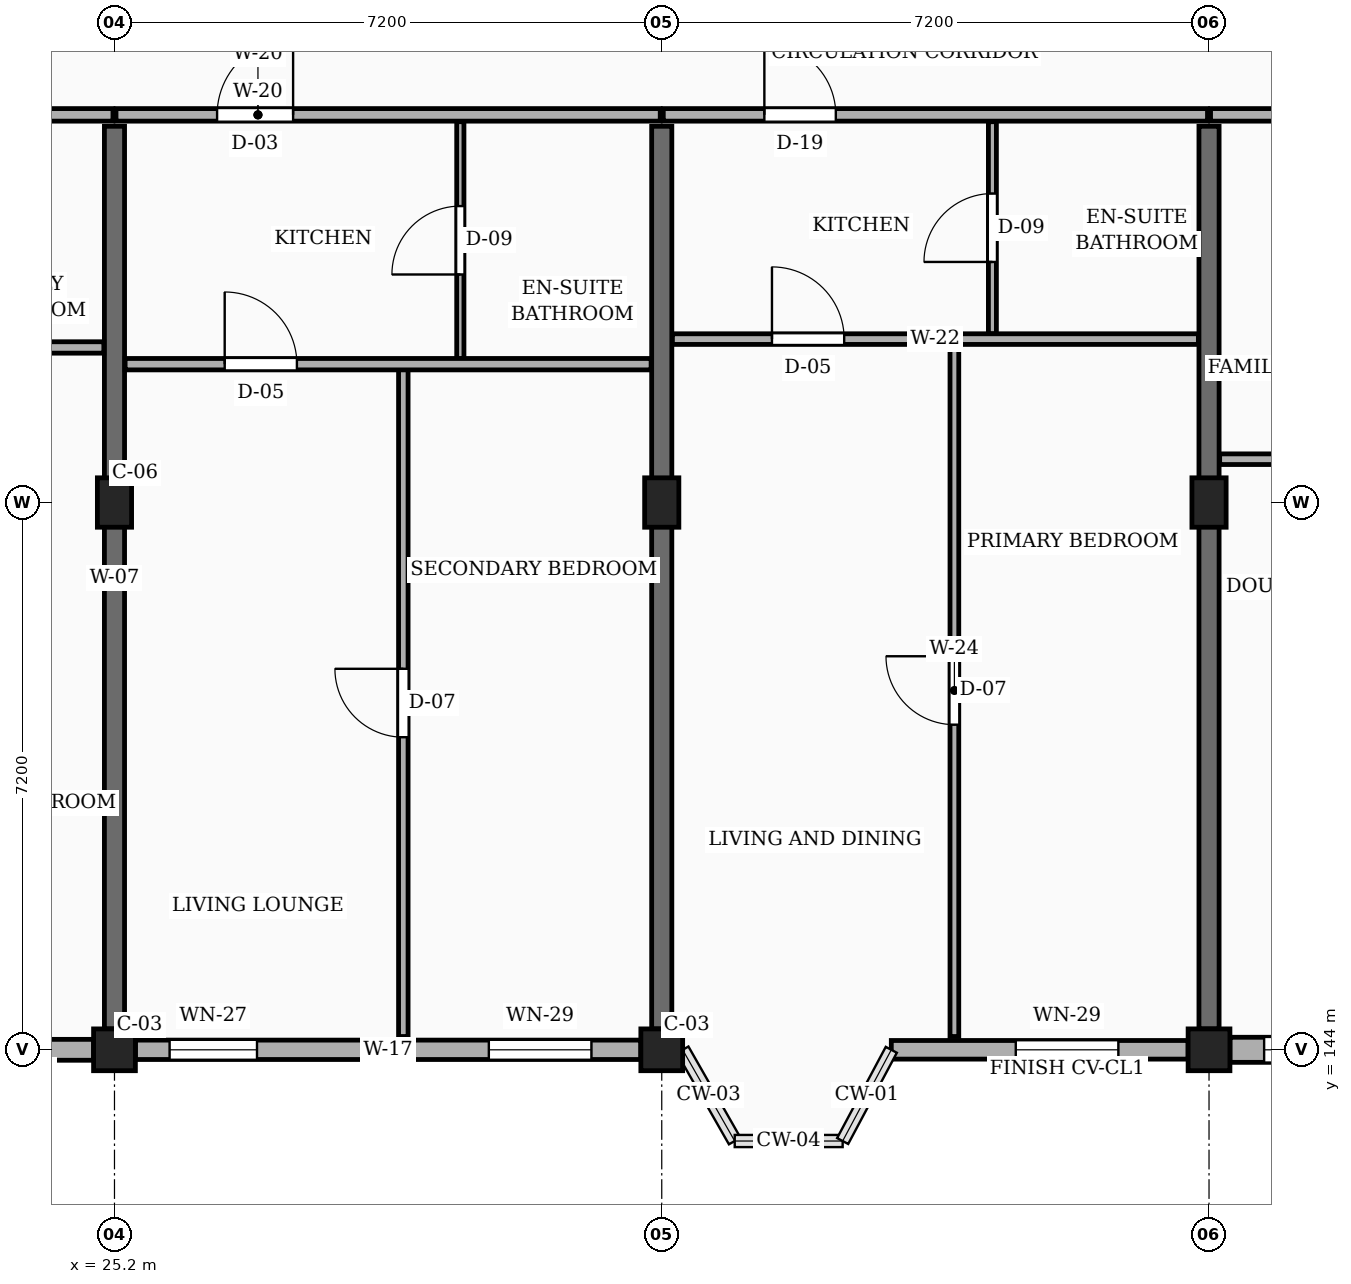
"""IFC4 building model, lengths in metres.
Left out: names, types, materials, properties, quantities, classifications, styles, units other than length and angle.
Written with IfcOpenShell. Run it as: python <this file> out.ifc"""

import sys

from ifc_helpers import new_model, si_unit, direction, frame, frame_2d, origin, origin_2d, place, context, subcontext, project, spatial, rectangle, extrude, element, fill, save


model = new_model("IFC4")
c1 = context("Model", 3, precision=1e-05, world=origin(), true_north=direction((0.0, 1.0)))
c2 = subcontext(c1, "Body", "Model", "MODEL_VIEW")
j1 = project(units=[si_unit("LENGTHUNIT", "METRE"), si_unit("PLANEANGLEUNIT", "RADIAN")], contexts=[c1])
p1 = place(None, origin())
s1 = spatial("IfcSite", under=j1, at=p1, CompositionType="ELEMENT")
p2 = place(p1, origin())
s2 = spatial("IfcBuilding", under=s1, at=p2, CompositionType="ELEMENT")
p3 = place(p2, frame((0.0, 0.0, 10.8)))
s3 = spatial("IfcBuildingStorey", under=s2, at=p3, CompositionType="ELEMENT", Elevation=10.8)
p4 = place(p3, frame((25.2, 144.0, 0.0), z_axis=(0.0, 0.0, 1.0), x_axis=(1.0, 0.0, 0.0)))
e1 = element("IfcColumn", 1, at=p4, inside=s3, PredefinedType="COLUMN", context=c2, shape_type="SweptSolid", body=[
    extrude(rectangle(XDim=0.55, YDim=0.55, at=origin_2d()), origin(), (0.0, 0.0, 1.0), 3.15),
])
p5 = place(p3, frame((25.2, 151.2, 0.0), z_axis=(0.0, 0.0, 1.0), x_axis=(1.0, 0.0, 0.0)))
e2 = element("IfcColumn", 2, at=p5, inside=s3, PredefinedType="COLUMN", context=c2, shape_type="SweptSolid", body=[
    extrude(rectangle(XDim=0.45, YDim=0.65, at=origin_2d()), origin(), (0.0, 0.0, 1.0), 3.15),
])
p6 = place(p3, frame((32.4, 144.0, 0.0), z_axis=(0.0, 0.0, 1.0), x_axis=(1.0, 0.0, 0.0)))
e3 = element("IfcColumn", 3, at=p6, inside=s3, PredefinedType="COLUMN", context=c2, shape_type="SweptSolid", body=[
    extrude(rectangle(XDim=0.55, YDim=0.55, at=origin_2d()), origin(), (0.0, 0.0, 1.0), 3.15),
])
p7 = place(p3, frame((32.4, 151.2, 0.0), z_axis=(0.0, 0.0, 1.0), x_axis=(1.0, 0.0, 0.0)))
e4 = element("IfcColumn", 4, at=p7, inside=s3, PredefinedType="COLUMN", context=c2, shape_type="SweptSolid", body=[
    extrude(rectangle(XDim=0.45, YDim=0.65, at=origin_2d()), origin(), (0.0, 0.0, 1.0), 3.15),
])
p8 = place(p3, frame((39.6, 144.0, 0.0), z_axis=(0.0, 0.0, 1.0), x_axis=(1.0, 0.0, 0.0)))
e5 = element("IfcColumn", 5, at=p8, inside=s3, PredefinedType="COLUMN", context=c2, shape_type="SweptSolid", body=[
    extrude(rectangle(XDim=0.55, YDim=0.55, at=origin_2d()), origin(), (0.0, 0.0, 1.0), 3.15),
])
p9 = place(p3, frame((39.6, 151.2, 0.0), z_axis=(0.0, 0.0, 1.0), x_axis=(1.0, 0.0, 0.0)))
e6 = element("IfcColumn", 6, at=p9, inside=s3, PredefinedType="COLUMN", context=c2, shape_type="SweptSolid", body=[
    extrude(rectangle(XDim=0.45, YDim=0.65, at=origin_2d()), origin(), (0.0, 0.0, 1.0), 3.15),
])
for number, where, z_axis, x_axis in (
    (7, (25.2, 144.275, 0.0), (0.0, 0.0, 1.0), (0.0, 1.0, 0.0)),
    (8, (32.4, 144.275, 0.0), (0.0, 0.0, 1.0), (0.0, 1.0, 0.0)),
    (9, (39.6, 144.275, 0.0), (0.0, 0.0, 1.0), (0.0, 1.0, 0.0)),
):
    element("IfcWall", number, at=place(p3, frame(where, z_axis=z_axis, x_axis=x_axis)), inside=s3, PredefinedType="SOLIDWALL", context=c2, shape_type="SweptSolid", body=[
        extrude(rectangle(XDim=11.875, YDim=0.265, at=frame_2d((5.938, 0.0))), origin(), (0.0, 0.0, 1.0), 2.185),
    ])
p10 = place(p3, frame((21.02, 144.0, 0.0), z_axis=(0.0, 0.0, 1.0), x_axis=(1.0, 0.0, 0.0)))
e10 = element("IfcWall", 10, at=p10, inside=s3, PredefinedType="SOLIDWALL", context=c2, shape_type="SweptSolid", body=[
    extrude(rectangle(XDim=3.905, YDim=0.275, at=frame_2d((1.953, 0.0))), origin(), (0.0, 0.0, 1.0), 2.455),
])
p11 = place(p10, frame((1.837, 0.0, 0.78)))
e11 = element("IfcOpeningElement", 11, at=p11, cuts=e10, PredefinedType="OPENING", context=c2, shape_type="SweptSolid", body=[
    extrude(rectangle(XDim=1.05, YDim=1.44, at=frame_2d((0.525, 0.72))), frame((0.0, 0.147, 0.0), z_axis=(0.0, -1.0, 0.0), x_axis=(1.0, 0.0, 0.0)), (0.0, 0.0, 1.0), 0.295),
])
p12 = place(p3, frame((25.475, 144.0, 0.0), z_axis=(0.0, 0.0, 1.0), x_axis=(1.0, 0.0, 0.0)))
e12 = element("IfcWall", 12, at=p12, inside=s3, PredefinedType="SOLIDWALL", context=c2, shape_type="SweptSolid", body=[
    extrude(rectangle(XDim=6.65, YDim=0.255, at=frame_2d((3.325, 0.0))), origin(), (0.0, 0.0, 1.0), 2.455),
])
p13 = place(p12, frame((0.45, 0.0, 0.78)))
e13 = element("IfcOpeningElement", 13, at=p13, cuts=e12, PredefinedType="OPENING", context=c2, shape_type="SweptSolid", body=[
    extrude(rectangle(XDim=1.15, YDim=1.44, at=frame_2d((0.575, 0.72))), frame((0.0, 0.137, 0.0), z_axis=(0.0, -1.0, 0.0), x_axis=(1.0, 0.0, 0.0)), (0.0, 0.0, 1.0), 0.275),
])
p14 = place(p12, frame((4.65, 0.0, 0.78)))
e14 = element("IfcOpeningElement", 14, at=p14, cuts=e12, PredefinedType="OPENING", context=c2, shape_type="SweptSolid", body=[
    extrude(rectangle(XDim=1.35, YDim=1.44, at=frame_2d((0.675, 0.72))), frame((0.0, 0.137, 0.0), z_axis=(0.0, -1.0, 0.0), x_axis=(1.0, 0.0, 0.0)), (0.0, 0.0, 1.0), 0.275),
])
p15 = place(p3, frame((35.42, 144.0, 0.0), z_axis=(0.0, 0.0, 1.0), x_axis=(1.0, 0.0, 0.0)))
e15 = element("IfcWall", 15, at=p15, inside=s3, PredefinedType="SOLIDWALL", context=c2, shape_type="SweptSolid", body=[
    extrude(rectangle(XDim=3.905, YDim=0.245, at=frame_2d((1.953, 0.0))), origin(), (0.0, 0.0, 1.0), 2.455),
])
p16 = place(p15, frame((1.637, 0.0, 0.78)))
e16 = element("IfcOpeningElement", 16, at=p16, cuts=e15, PredefinedType="OPENING", context=c2, shape_type="SweptSolid", body=[
    extrude(rectangle(XDim=1.35, YDim=1.44, at=frame_2d((0.675, 0.72))), frame((0.0, 0.133, 0.0), z_axis=(0.0, -1.0, 0.0), x_axis=(1.0, 0.0, 0.0)), (0.0, 0.0, 1.0), 0.265),
])
p17 = place(p3, frame((39.875, 144.0, 0.0), z_axis=(0.0, 0.0, 1.0), x_axis=(1.0, 0.0, 0.0)))
e17 = element("IfcWall", 17, at=p17, inside=s3, PredefinedType="SOLIDWALL", context=c2, shape_type="SweptSolid", body=[
    extrude(rectangle(XDim=6.65, YDim=0.33, at=frame_2d((3.325, 0.0))), origin(), (0.0, 0.0, 1.0), 2.455),
])
p18 = place(p17, frame((0.45, 0.0, 0.78)))
e18 = element("IfcOpeningElement", 18, at=p18, cuts=e17, PredefinedType="OPENING", context=c2, shape_type="SweptSolid", body=[
    extrude(rectangle(XDim=1.45, YDim=1.44, at=frame_2d((0.725, 0.72))), frame((0.0, 0.175, 0.0), z_axis=(0.0, -1.0, 0.0), x_axis=(1.0, 0.0, 0.0)), (0.0, 0.0, 1.0), 0.35),
])
p19 = place(p17, frame((4.65, 0.0, 0.78)))
e19 = element("IfcOpeningElement", 19, at=p19, cuts=e17, PredefinedType="OPENING", context=c2, shape_type="SweptSolid", body=[
    extrude(rectangle(XDim=0.92, YDim=1.15, at=frame_2d((0.46, 0.575))), frame((0.0, 0.175, 0.0), z_axis=(0.0, -1.0, 0.0), x_axis=(1.0, 0.0, 0.0)), (0.0, 0.0, 1.0), 0.35),
])
p20 = place(p3, frame((18.02, 156.3, 0.0), z_axis=(0.0, 0.0, 1.0), x_axis=(1.0, 0.0, 0.0)))
e20 = element("IfcWall", 20, at=p20, inside=s3, PredefinedType="PARTITIONING", context=c2, shape_type="SweptSolid", body=[
    extrude(rectangle(XDim=7.16, YDim=0.165, at=frame_2d((3.58, 0.0))), origin(), (0.0, 0.0, 1.0), 2.32),
])
p21 = place(p20, frame((1.33, 0.0, 0.0)))
e21 = element("IfcOpeningElement", 21, at=p21, cuts=e20, PredefinedType="OPENING", context=c2, shape_type="SweptSolid", body=[
    extrude(rectangle(XDim=1.14, YDim=2.18, at=frame_2d((0.57, 1.09))), frame((0.0, 0.093, 0.0), z_axis=(0.0, -1.0, 0.0), x_axis=(1.0, 0.0, 0.0)), (0.0, 0.0, 1.0), 0.185),
])
p22 = place(p3, frame((25.22, 156.3, 0.0), z_axis=(0.0, 0.0, 1.0), x_axis=(1.0, 0.0, 0.0)))
e22 = element("IfcWall", 22, at=p22, inside=s3, PredefinedType="PARTITIONING", context=c2, shape_type="SweptSolid", body=[
    extrude(rectangle(XDim=7.16, YDim=0.165, at=frame_2d((3.58, 0.0))), origin(), (0.0, 0.0, 1.0), 2.32),
])
p23 = place(p22, frame((1.33, 0.0, 0.0)))
e23 = element("IfcOpeningElement", 23, at=p23, cuts=e22, PredefinedType="OPENING", context=c2, shape_type="SweptSolid", body=[
    extrude(rectangle(XDim=1.0, YDim=2.15, at=frame_2d((0.5, 1.075))), frame((0.0, 0.093, 0.0), z_axis=(0.0, -1.0, 0.0), x_axis=(1.0, 0.0, 0.0)), (0.0, 0.0, 1.0), 0.185),
])
p24 = place(p3, frame((32.42, 156.3, 0.0), z_axis=(0.0, 0.0, 1.0), x_axis=(1.0, 0.0, 0.0)))
e24 = element("IfcWall", 24, at=p24, inside=s3, PredefinedType="PARTITIONING", context=c2, shape_type="SweptSolid", body=[
    extrude(rectangle(XDim=7.16, YDim=0.165, at=frame_2d((3.58, 0.0))), origin(), (0.0, 0.0, 1.0), 2.32),
])
p25 = place(p24, frame((1.33, 0.0, 0.0)))
e25 = element("IfcOpeningElement", 25, at=p25, cuts=e24, PredefinedType="OPENING", context=c2, shape_type="SweptSolid", body=[
    extrude(rectangle(XDim=0.94, YDim=2.12, at=frame_2d((0.47, 1.06))), frame((0.0, 0.093, 0.0), z_axis=(0.0, -1.0, 0.0), x_axis=(1.0, 0.0, 0.0)), (0.0, 0.0, 1.0), 0.185),
])
p26 = place(p3, frame((39.62, 156.3, 0.0), z_axis=(0.0, 0.0, 1.0), x_axis=(1.0, 0.0, 0.0)))
e26 = element("IfcWall", 26, at=p26, inside=s3, PredefinedType="PARTITIONING", context=c2, shape_type="SweptSolid", body=[
    extrude(rectangle(XDim=7.16, YDim=0.165, at=frame_2d((3.58, 0.0))), origin(), (0.0, 0.0, 1.0), 2.32),
])
p27 = place(p26, frame((4.78, 0.0, 0.0)))
e27 = element("IfcOpeningElement", 27, at=p27, cuts=e26, PredefinedType="OPENING", context=c2, shape_type="SweptSolid", body=[
    extrude(rectangle(XDim=1.14, YDim=2.18, at=frame_2d((0.57, 1.09))), frame((0.0, 0.093, 0.0), z_axis=(0.0, -1.0, 0.0), x_axis=(1.0, 0.0, 0.0)), (0.0, 0.0, 1.0), 0.185),
])
p28 = place(p3, frame((18.14, 153.24, 0.0), z_axis=(0.0, 0.0, 1.0), x_axis=(1.0, 0.0, 0.0)))
e28 = element("IfcWall", 28, at=p28, inside=s3, PredefinedType="PARTITIONING", context=c2, shape_type="SweptSolid", body=[
    extrude(rectangle(XDim=6.92, YDim=0.15, at=frame_2d((3.46, 0.0))), origin(), (0.0, 0.0, 1.0), 2.32),
])
p29 = place(p28, frame((1.31, 0.0, 0.0)))
e29 = element("IfcOpeningElement", 29, at=p29, cuts=e28, PredefinedType="OPENING", context=c2, shape_type="SweptSolid", body=[
    extrude(rectangle(XDim=0.92, YDim=2.1, at=frame_2d((0.46, 1.05))), frame((0.0, 0.085, 0.0), z_axis=(0.0, -1.0, 0.0), x_axis=(1.0, 0.0, 0.0)), (0.0, 0.0, 1.0), 0.17),
])
p30 = place(p3, frame((29.0, 144.175, 0.0), z_axis=(0.0, 0.0, 1.0), x_axis=(0.0, 1.0, 0.0)))
e30 = element("IfcWall", 30, at=p30, inside=s3, PredefinedType="PARTITIONING", context=c2, shape_type="SweptSolid", body=[
    extrude(rectangle(XDim=8.775, YDim=0.125, at=frame_2d((4.387, 0.0))), origin(), (0.0, 0.0, 1.0), 2.32),
])
p31 = place(p30, frame((3.938, 0.0, 0.0)))
e31 = element("IfcOpeningElement", 31, at=p31, cuts=e30, PredefinedType="OPENING", context=c2, shape_type="SweptSolid", body=[
    extrude(rectangle(XDim=0.9, YDim=2.1, at=frame_2d((0.45, 1.05))), frame((0.0, 0.073, 0.0), z_axis=(0.0, -1.0, 0.0), x_axis=(1.0, 0.0, 0.0)), (0.0, 0.0, 1.0), 0.145),
])
p32 = place(p3, frame((29.75, 153.09, 0.0), z_axis=(0.0, 0.0, 1.0), x_axis=(0.0, 1.0, 0.0)))
e32 = element("IfcWall", 32, at=p32, inside=s3, PredefinedType="PARTITIONING", context=c2, shape_type="SweptSolid", body=[
    extrude(rectangle(XDim=3.12, YDim=0.095, at=frame_2d((1.56, 0.0))), origin(), (0.0, 0.0, 1.0), 2.32),
])
p33 = place(p32, frame((1.11, 0.0, 0.0)))
e33 = element("IfcOpeningElement", 33, at=p33, cuts=e32, PredefinedType="OPENING", context=c2, shape_type="SweptSolid", body=[
    extrude(rectangle(XDim=0.9, YDim=2.05, at=frame_2d((0.45, 1.025))), frame((0.0, 0.058, 0.0), z_axis=(0.0, -1.0, 0.0), x_axis=(1.0, 0.0, 0.0)), (0.0, 0.0, 1.0), 0.115),
])
p34 = place(p3, frame((25.34, 153.02, 0.0), z_axis=(0.0, 0.0, 1.0), x_axis=(1.0, 0.0, 0.0)))
e34 = element("IfcWall", 34, at=p34, inside=s3, PredefinedType="PARTITIONING", context=c2, shape_type="SweptSolid", body=[
    extrude(rectangle(XDim=6.92, YDim=0.15, at=frame_2d((3.46, 0.0))), origin(), (0.0, 0.0, 1.0), 2.32),
])
p35 = place(p34, frame((1.31, 0.0, 0.0)))
e35 = element("IfcOpeningElement", 35, at=p35, cuts=e34, PredefinedType="OPENING", context=c2, shape_type="SweptSolid", body=[
    extrude(rectangle(XDim=0.95, YDim=2.1, at=frame_2d((0.475, 1.05))), frame((0.0, 0.085, 0.0), z_axis=(0.0, -1.0, 0.0), x_axis=(1.0, 0.0, 0.0)), (0.0, 0.0, 1.0), 0.17),
])
p36 = place(p3, frame((36.25, 144.175, 0.0), z_axis=(0.0, 0.0, 1.0), x_axis=(0.0, 1.0, 0.0)))
e36 = element("IfcWall", 36, at=p36, inside=s3, PredefinedType="PARTITIONING", context=c2, shape_type="SweptSolid", body=[
    extrude(rectangle(XDim=9.105, YDim=0.115, at=frame_2d((4.552, 0.0))), origin(), (0.0, 0.0, 1.0), 2.32),
])
p37 = place(p36, frame((4.103, 0.0, 0.0)))
e37 = element("IfcOpeningElement", 37, at=p37, cuts=e36, PredefinedType="OPENING", context=c2, shape_type="SweptSolid", body=[
    extrude(rectangle(XDim=0.9, YDim=2.1, at=frame_2d((0.45, 1.05))), frame((0.0, 0.067, 0.0), z_axis=(0.0, -1.0, 0.0), x_axis=(1.0, 0.0, 0.0)), (0.0, 0.0, 1.0), 0.135),
])
p38 = place(p3, frame((36.75, 153.42, 0.0), z_axis=(0.0, 0.0, 1.0), x_axis=(0.0, 1.0, 0.0)))
e38 = element("IfcWall", 38, at=p38, inside=s3, PredefinedType="PARTITIONING", context=c2, shape_type="SweptSolid", body=[
    extrude(rectangle(XDim=2.79, YDim=0.105, at=frame_2d((1.395, 0.0))), origin(), (0.0, 0.0, 1.0), 2.32),
])
p39 = place(p38, frame((0.945, 0.0, 0.0)))
e39 = element("IfcOpeningElement", 39, at=p39, cuts=e38, PredefinedType="OPENING", context=c2, shape_type="SweptSolid", body=[
    extrude(rectangle(XDim=0.9, YDim=2.05, at=frame_2d((0.45, 1.025))), frame((0.0, 0.062, 0.0), z_axis=(0.0, -1.0, 0.0), x_axis=(1.0, 0.0, 0.0)), (0.0, 0.0, 1.0), 0.125),
])
p40 = place(p3, frame((32.54, 153.35, 0.0), z_axis=(0.0, 0.0, 1.0), x_axis=(1.0, 0.0, 0.0)))
e40 = element("IfcWall", 40, at=p40, inside=s3, PredefinedType="PARTITIONING", context=c2, shape_type="SweptSolid", body=[
    extrude(rectangle(XDim=6.92, YDim=0.14, at=frame_2d((3.46, 0.0))), origin(), (0.0, 0.0, 1.0), 2.32),
])
p41 = place(p40, frame((1.31, 0.0, 0.0)))
e41 = element("IfcOpeningElement", 41, at=p41, cuts=e40, PredefinedType="OPENING", context=c2, shape_type="SweptSolid", body=[
    extrude(rectangle(XDim=0.95, YDim=2.1, at=frame_2d((0.475, 1.05))), frame((0.0, 0.08, 0.0), z_axis=(0.0, -1.0, 0.0), x_axis=(1.0, 0.0, 0.0)), (0.0, 0.0, 1.0), 0.16),
])
p42 = place(p3, frame((39.74, 151.77, 0.0), z_axis=(0.0, 0.0, 1.0), x_axis=(1.0, 0.0, 0.0)))
e42 = element("IfcWall", 42, at=p42, inside=s3, PredefinedType="PARTITIONING", context=c2, shape_type="SweptSolid", body=[
    extrude(rectangle(XDim=6.92, YDim=0.14, at=frame_2d((3.46, 0.0))), origin(), (0.0, 0.0, 1.0), 2.32),
])
p43 = place(p42, frame((4.66, 0.0, 0.0)))
e43 = element("IfcOpeningElement", 43, at=p43, cuts=e42, PredefinedType="OPENING", context=c2, shape_type="SweptSolid", body=[
    extrude(rectangle(XDim=0.92, YDim=2.1, at=frame_2d((0.46, 1.05))), frame((0.0, 0.08, 0.0), z_axis=(0.0, -1.0, 0.0), x_axis=(1.0, 0.0, 0.0)), (0.0, 0.0, 1.0), 0.16),
])
p44 = place(p13, origin())
e44 = element("IfcWindow", 44, at=p44, inside=s3, PartitioningType="SINGLE_PANEL", PredefinedType="WINDOW", context=c2, shape_type="SweptSolid", body=[
    extrude(rectangle(XDim=1.15, YDim=1.44, at=frame_2d((0.575, 0.72))), frame((0.0, 0.03, 0.0), z_axis=(0.0, -1.0, 0.0), x_axis=(1.0, 0.0, 0.0)), (0.0, 0.0, 1.0), 0.06),
])
fill(e13, e44)
p45 = place(p14, origin())
e45 = element("IfcWindow", 45, at=p45, inside=s3, PartitioningType="SINGLE_PANEL", PredefinedType="WINDOW", context=c2, shape_type="SweptSolid", body=[
    extrude(rectangle(XDim=1.35, YDim=1.44, at=frame_2d((0.675, 0.72))), frame((0.0, 0.03, 0.0), z_axis=(0.0, -1.0, 0.0), x_axis=(1.0, 0.0, 0.0)), (0.0, 0.0, 1.0), 0.06),
])
fill(e14, e45)
p46 = place(p16, origin())
e46 = element("IfcWindow", 46, at=p46, inside=s3, PartitioningType="SINGLE_PANEL", PredefinedType="WINDOW", context=c2, shape_type="SweptSolid", body=[
    extrude(rectangle(XDim=1.35, YDim=1.44, at=frame_2d((0.675, 0.72))), frame((0.0, 0.03, 0.0), z_axis=(0.0, -1.0, 0.0), x_axis=(1.0, 0.0, 0.0)), (0.0, 0.0, 1.0), 0.06),
])
fill(e16, e46)
p47 = place(p18, origin())
e47 = element("IfcWindow", 47, at=p47, inside=s3, PartitioningType="SINGLE_PANEL", PredefinedType="WINDOW", context=c2, shape_type="SweptSolid", body=[
    extrude(rectangle(XDim=1.45, YDim=1.44, at=frame_2d((0.725, 0.72))), frame((0.0, 0.03, 0.0), z_axis=(0.0, -1.0, 0.0), x_axis=(1.0, 0.0, 0.0)), (0.0, 0.0, 1.0), 0.06),
])
fill(e18, e47)
p48 = place(p23, origin())
e48 = element("IfcDoor", 48, at=p48, inside=s3, OperationType="SINGLE_SWING_RIGHT", PredefinedType="DOOR", context=c2, shape_type="SweptSolid", body=[
    extrude(rectangle(XDim=1.0, YDim=2.15, at=frame_2d((0.5, 1.075))), frame((0.0, 0.025, 0.0), z_axis=(0.0, -1.0, 0.0), x_axis=(1.0, 0.0, 0.0)), (0.0, 0.0, 1.0), 0.05),
])
fill(e23, e48)
p49 = place(p25, origin())
e49 = element("IfcDoor", 49, at=p49, inside=s3, OperationType="SINGLE_SWING_LEFT", PredefinedType="DOOR", context=c2, shape_type="SweptSolid", body=[
    extrude(rectangle(XDim=0.94, YDim=2.12, at=frame_2d((0.47, 1.06))), frame((0.0, 0.025, 0.0), z_axis=(0.0, -1.0, 0.0), x_axis=(1.0, 0.0, 0.0)), (0.0, 0.0, 1.0), 0.05),
])
fill(e25, e49)
p50 = place(p31, origin())
e50 = element("IfcDoor", 50, at=p50, inside=s3, OperationType="SINGLE_SWING_RIGHT", PredefinedType="DOOR", context=c2, shape_type="SweptSolid", body=[
    extrude(rectangle(XDim=0.9, YDim=2.1, at=frame_2d((0.45, 1.05))), frame((0.0, 0.025, 0.0), z_axis=(0.0, -1.0, 0.0), x_axis=(1.0, 0.0, 0.0)), (0.0, 0.0, 1.0), 0.05),
])
fill(e31, e50)
p51 = place(p33, origin())
e51 = element("IfcDoor", 51, at=p51, inside=s3, OperationType="SINGLE_SWING_LEFT", PredefinedType="DOOR", context=c2, shape_type="SweptSolid", body=[
    extrude(rectangle(XDim=0.9, YDim=2.05, at=frame_2d((0.45, 1.025))), frame((0.0, 0.025, 0.0), z_axis=(0.0, -1.0, 0.0), x_axis=(1.0, 0.0, 0.0)), (0.0, 0.0, 1.0), 0.05),
])
fill(e33, e51)
p52 = place(p35, origin())
e52 = element("IfcDoor", 52, at=p52, inside=s3, OperationType="SINGLE_SWING_LEFT", PredefinedType="DOOR", context=c2, shape_type="SweptSolid", body=[
    extrude(rectangle(XDim=0.95, YDim=2.1, at=frame_2d((0.475, 1.05))), frame((0.0, 0.025, 0.0), z_axis=(0.0, -1.0, 0.0), x_axis=(1.0, 0.0, 0.0)), (0.0, 0.0, 1.0), 0.05),
])
fill(e35, e52)
p53 = place(p37, origin())
e53 = element("IfcDoor", 53, at=p53, inside=s3, OperationType="SINGLE_SWING_RIGHT", PredefinedType="DOOR", context=c2, shape_type="SweptSolid", body=[
    extrude(rectangle(XDim=0.9, YDim=2.1, at=frame_2d((0.45, 1.05))), frame((0.0, 0.025, 0.0), z_axis=(0.0, -1.0, 0.0), x_axis=(1.0, 0.0, 0.0)), (0.0, 0.0, 1.0), 0.05),
])
fill(e37, e53)
p54 = place(p39, origin())
e54 = element("IfcDoor", 54, at=p54, inside=s3, OperationType="SINGLE_SWING_LEFT", PredefinedType="DOOR", context=c2, shape_type="SweptSolid", body=[
    extrude(rectangle(XDim=0.9, YDim=2.05, at=frame_2d((0.45, 1.025))), frame((0.0, 0.025, 0.0), z_axis=(0.0, -1.0, 0.0), x_axis=(1.0, 0.0, 0.0)), (0.0, 0.0, 1.0), 0.05),
])
fill(e39, e54)
p55 = place(p41, origin())
e55 = element("IfcDoor", 55, at=p55, inside=s3, OperationType="SINGLE_SWING_LEFT", PredefinedType="DOOR", context=c2, shape_type="SweptSolid", body=[
    extrude(rectangle(XDim=0.95, YDim=2.1, at=frame_2d((0.475, 1.05))), frame((0.0, 0.025, 0.0), z_axis=(0.0, -1.0, 0.0), x_axis=(1.0, 0.0, 0.0)), (0.0, 0.0, 1.0), 0.05),
])
fill(e41, e55)
save(model, sys.argv[1])
